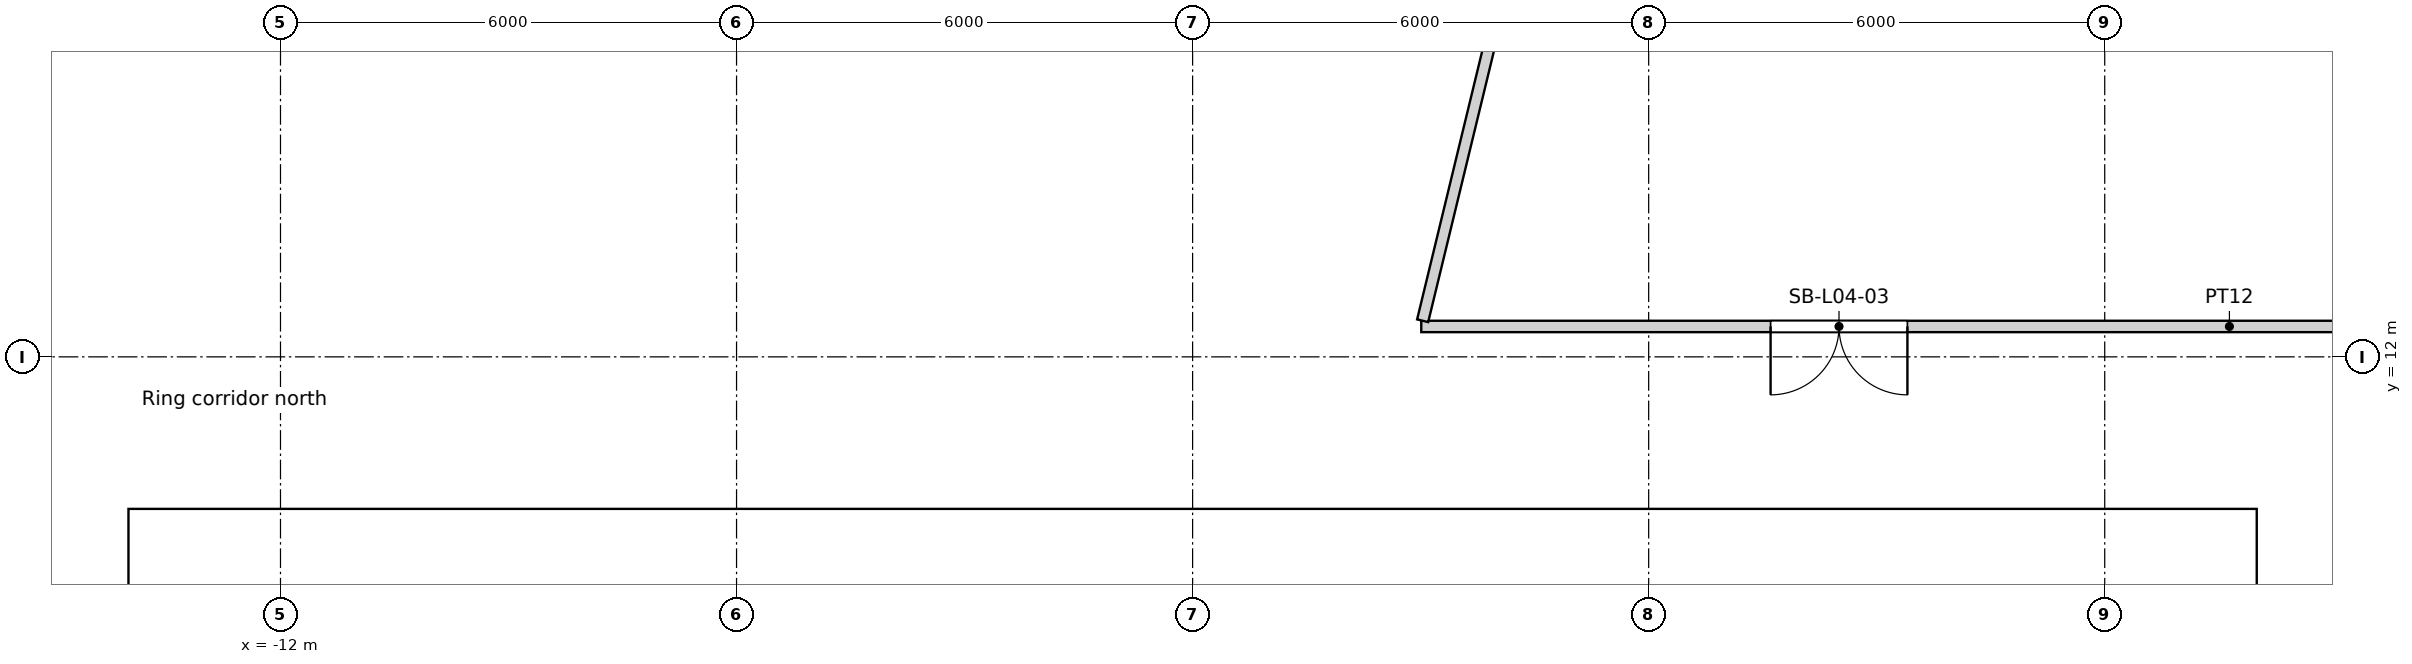
"""IFC4 building model, lengths in metres.
Left out: names, types, materials, properties, quantities, classifications, styles, units other than length and angle.
Written with IfcOpenShell. Run it as: python <this file> out.ifc"""

import sys

from ifc_helpers import new_model, si_unit, direction, frame, frame_2d, origin, origin_2d, place, context, subcontext, project, spatial, rectangle, circle, extrude, element, fill, save


model = new_model("IFC4")
c1 = context("Model", 3, precision=1e-05, world=origin(), true_north=direction((0.0, 1.0)))
c2 = subcontext(c1, "Body", "Model", "MODEL_VIEW")
j1 = project(units=[si_unit("LENGTHUNIT", "METRE"), si_unit("PLANEANGLEUNIT", "RADIAN")], contexts=[c1])
p1 = place(None, origin())
s1 = spatial("IfcSite", under=j1, at=p1, CompositionType="ELEMENT")
p2 = place(p1, origin())
s2 = spatial("IfcBuilding", under=s1, at=p2, CompositionType="ELEMENT")
p3 = place(p2, frame((0.0, 0.0, 23.4)))
s3 = spatial("IfcBuildingStorey", under=s2, at=p3, CompositionType="ELEMENT", Elevation=23.4)
for number, where, z_axis, x_axis in (
    (1, (15.552, 10.603, 0.0), (0.0, 0.0, 1.0), (1.0, 0.0, 0.0)),
    (2, (11.735, 14.716, 0.0), (0.0, 0.0, 1.0), (1.0, 0.0, 0.0)),
    (3, (-9.411, 16.301, 0.0), (0.0, 0.0, 1.0), (1.0, 0.0, 0.0)),
    (4, (-13.798, 12.802, 0.0), (0.0, 0.0, 1.0), (1.0, 0.0, 0.0)),
):
    element("IfcColumn", number, at=place(p3, frame(where, z_axis=z_axis, x_axis=x_axis)), inside=s3, PredefinedType="COLUMN", context=c2, shape_type="SweptSolid", body=[
        extrude(circle(Radius=0.8, at=origin_2d()), origin(), (0.0, 0.0, 1.0), 4.8),
    ])
p4 = place(p3, frame((-14.0, 9.4, 0.0), z_axis=(0.0, 0.0, 1.0), x_axis=(1.0, 0.0, 0.0)))
e5 = element("IfcWall", 5, at=p4, inside=s3, PredefinedType="SOLIDWALL", context=c2, shape_type="SweptSolid", body=[
    extrude(rectangle(XDim=28.0, YDim=1.2, at=frame_2d((14.0, 0.0))), origin(), (0.0, 0.0, 1.0), 4.8),
])
p5 = place(p4, frame((9.8, 0.0, 0.0)))
e6 = element("IfcOpeningElement", 6, at=p5, cuts=e5, PredefinedType="OPENING", context=c2, shape_type="SweptSolid", body=[
    extrude(rectangle(XDim=1.8, YDim=2.1, at=frame_2d((0.9, 1.05))), frame((0.0, 0.6, 0.0), z_axis=(0.0, -1.0, 0.0), x_axis=(1.0, 0.0, 0.0)), (0.0, 0.0, 1.0), 1.2),
])
p6 = place(p3, frame((6.205, 25.577, 0.0), z_axis=(0.0, 0.0, 1.0), x_axis=(-0.235759138487, -0.971811519082, 0.0)))
e7 = element("IfcWall", 7, at=p6, inside=s3, PredefinedType="PARTITIONING", context=c2, shape_type="SweptSolid", body=[
    extrude(rectangle(XDim=13.482, YDim=0.15, at=frame_2d((6.741, 0.0))), origin(), (0.0, 0.0, 1.0), 3.75),
])
p7 = place(p3, frame((3.008, 12.4, 0.0), z_axis=(0.0, 0.0, 1.0), x_axis=(1.0, 0.0, 0.0)))
e8 = element("IfcWall", 8, at=p7, inside=s3, PredefinedType="PARTITIONING", context=c2, shape_type="SweptSolid", body=[
    extrude(rectangle(XDim=14.818, YDim=0.15, at=frame_2d((7.409, 0.0))), origin(), (0.0, 0.0, 1.0), 3.75),
])
p8 = place(p7, frame((4.596, 0.0, 0.0)))
e9 = element("IfcOpeningElement", 9, at=p8, cuts=e8, PredefinedType="OPENING", context=c2, shape_type="SweptSolid", body=[
    extrude(rectangle(XDim=1.8, YDim=2.4, at=frame_2d((0.9, 1.2))), frame((0.0, 0.075, 0.0), z_axis=(0.0, -1.0, 0.0), x_axis=(1.0, 0.0, 0.0)), (0.0, 0.0, 1.0), 0.15),
])
p9 = place(p5, origin())
e10 = element("IfcDoor", 10, at=p9, inside=s3, OperationType="DOUBLE_DOOR_SINGLE_SWING", PredefinedType="DOOR", context=c2, shape_type="SweptSolid", body=[
    extrude(rectangle(XDim=1.8, YDim=2.1, at=frame_2d((0.9, 1.05))), frame((0.0, 0.025, 0.0), z_axis=(0.0, -1.0, 0.0), x_axis=(1.0, 0.0, 0.0)), (0.0, 0.0, 1.0), 0.05),
])
fill(e6, e10)
p10 = place(p8, origin())
e11 = element("IfcDoor", 11, at=p10, inside=s3, OperationType="DOUBLE_DOOR_SINGLE_SWING", PredefinedType="DOOR", context=c2, shape_type="SweptSolid", body=[
    extrude(rectangle(XDim=1.8, YDim=2.4, at=frame_2d((0.9, 1.2))), frame((0.0, 0.025, 0.0), z_axis=(0.0, -1.0, 0.0), x_axis=(1.0, 0.0, 0.0)), (0.0, 0.0, 1.0), 0.05),
])
fill(e9, e11)
save(model, sys.argv[1])
